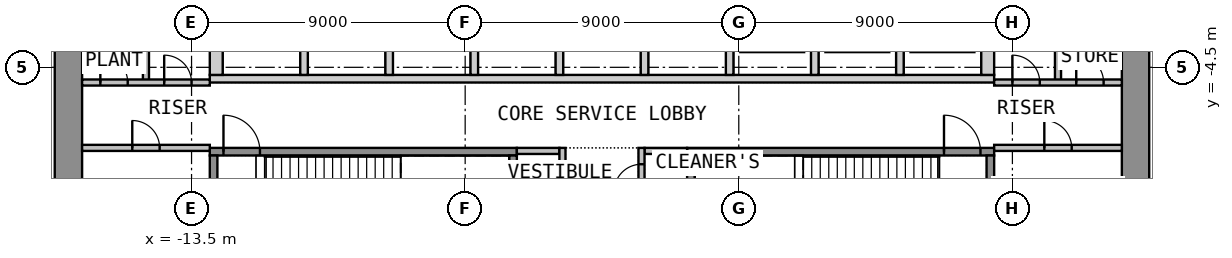
"""IFC4 building model, lengths in metres.
Left out: names, types, materials, properties, quantities, classifications, styles, units other than length and angle.
Written with IfcOpenShell. Run it as: python <this file> out.ifc"""

import sys

from ifc_helpers import new_model, si_unit, direction, frame, frame_2d, origin, place, context, subcontext, project, spatial, polyline, rectangle, outline, extrude, element, fill, save


model = new_model("IFC4")
c1 = context("Model", 3, precision=1e-05, world=origin(), true_north=direction((0.0, 1.0)))
c2 = subcontext(c1, "Body", "Model", "MODEL_VIEW")
j1 = project(units=[si_unit("LENGTHUNIT", "METRE"), si_unit("PLANEANGLEUNIT", "RADIAN")], contexts=[c1])
p1 = place(None, origin())
s1 = spatial("IfcSite", under=j1, at=p1, CompositionType="ELEMENT")
p2 = place(p1, origin())
s2 = spatial("IfcBuilding", under=s1, at=p2, CompositionType="ELEMENT")
p3 = place(p2, origin())
s3 = spatial("IfcBuildingStorey", under=s2, at=p3, CompositionType="ELEMENT", Elevation=0.0)
p4 = place(p3, frame((-17.55, -12.6, 0.0), z_axis=(0.0, 0.0, 1.0), x_axis=(0.0, 1.0, 0.0)))
e1 = element("IfcWall", 1, at=p4, inside=s3, PredefinedType="SHEAR", context=c2, shape_type="SweptSolid", body=[
    extrude(rectangle(XDim=25.2, YDim=0.9, at=frame_2d((12.6, 0.0))), origin(), (0.0, 0.0, 1.0), 5.6),
])
p5 = place(p4, frame((11.4, 0.0, 0.0)))
e2 = element("IfcOpeningElement", 2, at=p5, cuts=e1, PredefinedType="OPENING", context=c2, shape_type="SweptSolid", body=[
    extrude(rectangle(XDim=2.4, YDim=2.1, at=frame_2d((1.2, 1.05))), frame((0.0, 0.46, 0.0), z_axis=(0.0, -1.0, 0.0), x_axis=(1.0, 0.0, 0.0)), (0.0, 0.0, 1.0), 0.92),
])
p6 = place(p3, frame((17.55, -12.6, 0.0), z_axis=(0.0, 0.0, 1.0), x_axis=(0.0, 1.0, 0.0)))
e3 = element("IfcWall", 3, at=p6, inside=s3, PredefinedType="SHEAR", context=c2, shape_type="SweptSolid", body=[
    extrude(rectangle(XDim=25.2, YDim=0.9, at=frame_2d((12.6, 0.0))), origin(), (0.0, 0.0, 1.0), 5.6),
])
p7 = place(p6, frame((11.4, 0.0, 0.0)))
e4 = element("IfcOpeningElement", 4, at=p7, cuts=e3, PredefinedType="OPENING", context=c2, shape_type="SweptSolid", body=[
    extrude(rectangle(XDim=2.4, YDim=2.1, at=frame_2d((1.2, 1.05))), frame((0.0, 0.46, 0.0), z_axis=(0.0, -1.0, 0.0), x_axis=(1.0, 0.0, 0.0)), (0.0, 0.0, 1.0), 0.92),
])
p8 = place(p3, origin())
e5 = element("IfcWall", 5, at=p8, inside=s3, PredefinedType="SHEAR", context=c2, shape_type="SweptSolid", body=[
    extrude(outline(polyline([(-12.9, -5.0), (12.9, -5.0), (12.9, -4.75), (-12.9, -4.75), (-12.9, -5.0)])), origin(), (0.0, 0.0, 1.0), 5.6),
])
p9 = place(p3, origin())
e6 = element("IfcWall", 6, at=p9, inside=s3, PredefinedType="SHEAR", context=c2, shape_type="SweptSolid", body=[
    extrude(outline(polyline([(-12.9, -4.75), (-12.475, -4.75), (-12.475, -2.05), (-12.9, -2.05), (-12.9, -4.75)])), origin(), (0.0, 0.0, 1.0), 5.6),
])
p10 = place(p3, origin())
e7 = element("IfcWall", 7, at=p10, inside=s3, PredefinedType="SHEAR", context=c2, shape_type="SweptSolid", body=[
    extrude(outline(polyline([(-9.925, -4.75), (-9.675, -4.75), (-9.675, -2.05), (-9.925, -2.05), (-9.925, -4.75)])), origin(), (0.0, 0.0, 1.0), 5.6),
])
p11 = place(p3, origin())
e8 = element("IfcWall", 8, at=p11, inside=s3, PredefinedType="SHEAR", context=c2, shape_type="SweptSolid", body=[
    extrude(outline(polyline([(-7.125, -4.75), (-6.875, -4.75), (-6.875, -2.05), (-7.125, -2.05), (-7.125, -4.75)])), origin(), (0.0, 0.0, 1.0), 5.6),
])
p12 = place(p3, origin())
e9 = element("IfcWall", 9, at=p12, inside=s3, PredefinedType="SHEAR", context=c2, shape_type="SweptSolid", body=[
    extrude(outline(polyline([(-4.325, -4.75), (-4.075, -4.75), (-4.075, -2.05), (-4.325, -2.05), (-4.325, -4.75)])), origin(), (0.0, 0.0, 1.0), 5.6),
])
p13 = place(p3, origin())
e10 = element("IfcWall", 10, at=p13, inside=s3, PredefinedType="SHEAR", context=c2, shape_type="SweptSolid", body=[
    extrude(outline(polyline([(-1.525, -4.75), (-1.275, -4.75), (-1.275, -2.05), (-1.525, -2.05), (-1.525, -4.75)])), origin(), (0.0, 0.0, 1.0), 5.6),
])
p14 = place(p3, origin())
e11 = element("IfcWall", 11, at=p14, inside=s3, PredefinedType="SHEAR", context=c2, shape_type="SweptSolid", body=[
    extrude(outline(polyline([(1.275, -4.75), (1.525, -4.75), (1.525, -2.05), (1.275, -2.05), (1.275, -4.75)])), origin(), (0.0, 0.0, 1.0), 5.6),
])
p15 = place(p3, origin())
e12 = element("IfcWall", 12, at=p15, inside=s3, PredefinedType="SHEAR", context=c2, shape_type="SweptSolid", body=[
    extrude(outline(polyline([(4.075, -4.75), (4.325, -4.75), (4.325, -2.05), (4.075, -2.05), (4.075, -4.75)])), origin(), (0.0, 0.0, 1.0), 5.6),
])
p16 = place(p3, origin())
e13 = element("IfcWall", 13, at=p16, inside=s3, PredefinedType="SHEAR", context=c2, shape_type="SweptSolid", body=[
    extrude(outline(polyline([(6.875, -4.75), (7.125, -4.75), (7.125, -2.05), (6.875, -2.05), (6.875, -4.75)])), origin(), (0.0, 0.0, 1.0), 5.6),
])
p17 = place(p3, origin())
e14 = element("IfcWall", 14, at=p17, inside=s3, PredefinedType="SHEAR", context=c2, shape_type="SweptSolid", body=[
    extrude(outline(polyline([(9.675, -4.75), (9.925, -4.75), (9.925, -2.05), (9.675, -2.05), (9.675, -4.75)])), origin(), (0.0, 0.0, 1.0), 5.6),
])
p18 = place(p3, origin())
e15 = element("IfcWall", 15, at=p18, inside=s3, PredefinedType="SHEAR", context=c2, shape_type="SweptSolid", body=[
    extrude(outline(polyline([(12.475, -4.75), (12.9, -4.75), (12.9, -2.05), (12.475, -2.05), (12.475, -4.75)])), origin(), (0.0, 0.0, 1.0), 5.6),
])
p19 = place(p3, frame((-12.9, -7.275, 0.0), z_axis=(0.0, 0.0, 1.0), x_axis=(1.0, 0.0, 0.0)))
e16 = element("IfcWall", 16, at=p19, inside=s3, PredefinedType="SHEAR", context=c2, shape_type="SweptSolid", body=[
    extrude(rectangle(XDim=10.1, YDim=0.25, at=frame_2d((5.05, 0.0))), origin(), (0.0, 0.0, 1.0), 5.6),
])
p20 = place(p19, frame((0.45, 0.0, 0.0)))
e17 = element("IfcOpeningElement", 17, at=p20, cuts=e16, PredefinedType="OPENING", context=c2, shape_type="SweptSolid", body=[
    extrude(rectangle(XDim=1.2, YDim=2.1, at=frame_2d((0.6, 1.05))), frame((0.0, 0.135, 0.0), z_axis=(0.0, -1.0, 0.0), x_axis=(1.0, 0.0, 0.0)), (0.0, 0.0, 1.0), 0.27),
])
for number, where, z_axis, x_axis in (
    (18, (-12.775, -10.65, 0.0), (0.0, 0.0, 1.0), (0.0, 1.0, 0.0)),
    (19, (-2.925, -10.65, 0.0), (0.0, 0.0, 1.0), (0.0, 1.0, 0.0)),
):
    element("IfcWall", number, at=place(p3, frame(where, z_axis=z_axis, x_axis=x_axis)), inside=s3, PredefinedType="SHEAR", context=c2, shape_type="SweptSolid", body=[
        extrude(rectangle(XDim=3.25, YDim=0.25, at=frame_2d((1.625, 0.0))), origin(), (0.0, 0.0, 1.0), 5.6),
    ])
p21 = place(p3, frame((2.8, -7.275, 0.0), z_axis=(0.0, 0.0, 1.0), x_axis=(1.0, 0.0, 0.0)))
e20 = element("IfcWall", 20, at=p21, inside=s3, PredefinedType="SHEAR", context=c2, shape_type="SweptSolid", body=[
    extrude(rectangle(XDim=10.1, YDim=0.25, at=frame_2d((5.05, 0.0))), origin(), (0.0, 0.0, 1.0), 5.6),
])
p22 = place(p21, frame((8.45, 0.0, 0.0)))
e21 = element("IfcOpeningElement", 21, at=p22, cuts=e20, PredefinedType="OPENING", context=c2, shape_type="SweptSolid", body=[
    extrude(rectangle(XDim=1.2, YDim=2.1, at=frame_2d((0.6, 1.05))), frame((0.0, 0.135, 0.0), z_axis=(0.0, -1.0, 0.0), x_axis=(1.0, 0.0, 0.0)), (0.0, 0.0, 1.0), 0.27),
])
for number, where, z_axis, x_axis in (
    (22, (2.925, -10.65, 0.0), (0.0, 0.0, 1.0), (0.0, 1.0, 0.0)),
    (23, (12.775, -10.65, 0.0), (0.0, 0.0, 1.0), (0.0, 1.0, 0.0)),
):
    element("IfcWall", number, at=place(p3, frame(where, z_axis=z_axis, x_axis=x_axis)), inside=s3, PredefinedType="SHEAR", context=c2, shape_type="SweptSolid", body=[
        extrude(rectangle(XDim=3.25, YDim=0.25, at=frame_2d((1.625, 0.0))), origin(), (0.0, 0.0, 1.0), 5.6),
    ])
for number, where, z_axis, x_axis in (
    (24, (-2.8, -7.25, 0.0), (0.0, 0.0, 1.0), (1.0, 0.0, 0.0)),
    (25, (1.4, -7.25, 0.0), (0.0, 0.0, 1.0), (1.0, 0.0, 0.0)),
):
    element("IfcWall", number, at=place(p3, frame(where, z_axis=z_axis, x_axis=x_axis)), inside=s3, PredefinedType="PARTITIONING", context=c2, shape_type="SweptSolid", body=[
        extrude(rectangle(XDim=1.4, YDim=0.2, at=frame_2d((0.7, 0.0))), origin(), (0.0, 0.0, 1.0), 5.6),
    ])
p23 = place(p3, frame((-1.3, -12.6, 0.0), z_axis=(0.0, 0.0, 1.0), x_axis=(0.0, 1.0, 0.0)))
e26 = element("IfcWall", 26, at=p23, inside=s3, PredefinedType="PARTITIONING", context=c2, shape_type="SweptSolid", body=[
    extrude(rectangle(XDim=5.45, YDim=0.2, at=frame_2d((2.725, 0.0))), origin(), (0.0, 0.0, 1.0), 5.6),
])
p24 = place(p23, frame((0.337, 0.0, 0.0)))
e27 = element("IfcOpeningElement", 27, at=p24, cuts=e26, PredefinedType="OPENING", context=c2, shape_type="SweptSolid", body=[
    extrude(rectangle(XDim=0.9, YDim=2.1, at=frame_2d((0.45, 1.05))), frame((0.0, 0.11, 0.0), z_axis=(0.0, -1.0, 0.0), x_axis=(1.0, 0.0, 0.0)), (0.0, 0.0, 1.0), 0.22),
])
p25 = place(p23, frame((2.962, 0.0, 0.0)))
e28 = element("IfcOpeningElement", 28, at=p25, cuts=e26, PredefinedType="OPENING", context=c2, shape_type="SweptSolid", body=[
    extrude(rectangle(XDim=0.9, YDim=2.1, at=frame_2d((0.45, 1.05))), frame((0.0, 0.11, 0.0), z_axis=(0.0, -1.0, 0.0), x_axis=(1.0, 0.0, 0.0)), (0.0, 0.0, 1.0), 0.22),
])
p26 = place(p3, frame((1.3, -12.6, 0.0), z_axis=(0.0, 0.0, 1.0), x_axis=(0.0, 1.0, 0.0)))
e29 = element("IfcWall", 29, at=p26, inside=s3, PredefinedType="PARTITIONING", context=c2, shape_type="SweptSolid", body=[
    extrude(rectangle(XDim=5.45, YDim=0.2, at=frame_2d((2.725, 0.0))), origin(), (0.0, 0.0, 1.0), 5.6),
])
p27 = place(p26, frame((1.387, 0.0, 0.0)))
e30 = element("IfcOpeningElement", 30, at=p27, cuts=e29, PredefinedType="OPENING", context=c2, shape_type="SweptSolid", body=[
    extrude(rectangle(XDim=0.9, YDim=2.1, at=frame_2d((0.45, 1.05))), frame((0.0, 0.11, 0.0), z_axis=(0.0, -1.0, 0.0), x_axis=(1.0, 0.0, 0.0)), (0.0, 0.0, 1.0), 0.22),
])
p28 = place(p26, frame((4.012, 0.0, 0.0)))
e31 = element("IfcOpeningElement", 31, at=p28, cuts=e29, PredefinedType="OPENING", context=c2, shape_type="SweptSolid", body=[
    extrude(rectangle(XDim=0.9, YDim=2.1, at=frame_2d((0.45, 1.05))), frame((0.0, 0.11, 0.0), z_axis=(0.0, -1.0, 0.0), x_axis=(1.0, 0.0, 0.0)), (0.0, 0.0, 1.0), 0.22),
])
p29 = place(p3, frame((-17.1, -7.15, 0.0), z_axis=(0.0, 0.0, 1.0), x_axis=(1.0, 0.0, 0.0)))
e32 = element("IfcWall", 32, at=p29, inside=s3, PredefinedType="PARTITIONING", context=c2, shape_type="SweptSolid", body=[
    extrude(rectangle(XDim=4.2, YDim=0.2, at=frame_2d((2.1, 0.0))), origin(), (0.0, 0.0, 1.0), 5.6),
])
p30 = place(p29, frame((1.65, 0.0, 0.0)))
e33 = element("IfcOpeningElement", 33, at=p30, cuts=e32, PredefinedType="OPENING", context=c2, shape_type="SweptSolid", body=[
    extrude(rectangle(XDim=0.9, YDim=2.1, at=frame_2d((0.45, 1.05))), frame((0.0, 0.11, 0.0), z_axis=(0.0, -1.0, 0.0), x_axis=(1.0, 0.0, 0.0)), (0.0, 0.0, 1.0), 0.22),
])
p31 = place(p3, frame((-15.0, -5.0, 0.0), z_axis=(0.0, 0.0, 1.0), x_axis=(0.0, 1.0, 0.0)))
e34 = element("IfcWall", 34, at=p31, inside=s3, PredefinedType="PARTITIONING", context=c2, shape_type="SweptSolid", body=[
    extrude(rectangle(XDim=3.2, YDim=0.2, at=frame_2d((1.6, 0.0))), origin(), (0.0, 0.0, 1.0), 5.6),
])
p32 = place(p3, frame((-17.1, -5.0, 0.0), z_axis=(0.0, 0.0, 1.0), x_axis=(1.0, 0.0, 0.0)))
e35 = element("IfcWall", 35, at=p32, inside=s3, PredefinedType="PARTITIONING", context=c2, shape_type="SweptSolid", body=[
    extrude(rectangle(XDim=4.2, YDim=0.2, at=frame_2d((2.1, 0.0))), origin(), (0.0, 0.0, 1.0), 5.6),
])
p33 = place(p32, frame((0.6, 0.0, 0.0)))
e36 = element("IfcOpeningElement", 36, at=p33, cuts=e35, PredefinedType="OPENING", context=c2, shape_type="SweptSolid", body=[
    extrude(rectangle(XDim=0.9, YDim=2.1, at=frame_2d((0.45, 1.05))), frame((0.0, 0.11, 0.0), z_axis=(0.0, -1.0, 0.0), x_axis=(1.0, 0.0, 0.0)), (0.0, 0.0, 1.0), 0.22),
])
p34 = place(p32, frame((2.7, 0.0, 0.0)))
e37 = element("IfcOpeningElement", 37, at=p34, cuts=e35, PredefinedType="OPENING", context=c2, shape_type="SweptSolid", body=[
    extrude(rectangle(XDim=0.9, YDim=2.1, at=frame_2d((0.45, 1.05))), frame((0.0, 0.11, 0.0), z_axis=(0.0, -1.0, 0.0), x_axis=(1.0, 0.0, 0.0)), (0.0, 0.0, 1.0), 0.22),
])
p35 = place(p3, frame((12.9, -7.15, 0.0), z_axis=(0.0, 0.0, 1.0), x_axis=(1.0, 0.0, 0.0)))
e38 = element("IfcWall", 38, at=p35, inside=s3, PredefinedType="PARTITIONING", context=c2, shape_type="SweptSolid", body=[
    extrude(rectangle(XDim=4.2, YDim=0.2, at=frame_2d((2.1, 0.0))), origin(), (0.0, 0.0, 1.0), 5.6),
])
p36 = place(p35, frame((1.65, 0.0, 0.0)))
e39 = element("IfcOpeningElement", 39, at=p36, cuts=e38, PredefinedType="OPENING", context=c2, shape_type="SweptSolid", body=[
    extrude(rectangle(XDim=0.9, YDim=2.1, at=frame_2d((0.45, 1.05))), frame((0.0, 0.11, 0.0), z_axis=(0.0, -1.0, 0.0), x_axis=(1.0, 0.0, 0.0)), (0.0, 0.0, 1.0), 0.22),
])
p37 = place(p3, frame((15.0, -5.0, 0.0), z_axis=(0.0, 0.0, 1.0), x_axis=(0.0, 1.0, 0.0)))
e40 = element("IfcWall", 40, at=p37, inside=s3, PredefinedType="PARTITIONING", context=c2, shape_type="SweptSolid", body=[
    extrude(rectangle(XDim=3.2, YDim=0.2, at=frame_2d((1.6, 0.0))), origin(), (0.0, 0.0, 1.0), 5.6),
])
p38 = place(p3, frame((12.9, -5.0, 0.0), z_axis=(0.0, 0.0, 1.0), x_axis=(1.0, 0.0, 0.0)))
e41 = element("IfcWall", 41, at=p38, inside=s3, PredefinedType="PARTITIONING", context=c2, shape_type="SweptSolid", body=[
    extrude(rectangle(XDim=4.2, YDim=0.2, at=frame_2d((2.1, 0.0))), origin(), (0.0, 0.0, 1.0), 5.6),
])
p39 = place(p38, frame((0.6, 0.0, 0.0)))
e42 = element("IfcOpeningElement", 42, at=p39, cuts=e41, PredefinedType="OPENING", context=c2, shape_type="SweptSolid", body=[
    extrude(rectangle(XDim=0.9, YDim=2.1, at=frame_2d((0.45, 1.05))), frame((0.0, 0.11, 0.0), z_axis=(0.0, -1.0, 0.0), x_axis=(1.0, 0.0, 0.0)), (0.0, 0.0, 1.0), 0.22),
])
p40 = place(p38, frame((2.7, 0.0, 0.0)))
e43 = element("IfcOpeningElement", 43, at=p40, cuts=e41, PredefinedType="OPENING", context=c2, shape_type="SweptSolid", body=[
    extrude(rectangle(XDim=0.9, YDim=2.1, at=frame_2d((0.45, 1.05))), frame((0.0, 0.11, 0.0), z_axis=(0.0, -1.0, 0.0), x_axis=(1.0, 0.0, 0.0)), (0.0, 0.0, 1.0), 0.22),
])
p41 = place(p20, origin())
e44 = element("IfcDoor", 44, at=p41, inside=s3, OperationType="SINGLE_SWING_LEFT", PredefinedType="DOOR", context=c2, shape_type="SweptSolid", body=[
    extrude(rectangle(XDim=1.2, YDim=2.1, at=frame_2d((0.6, 1.05))), frame((0.0, 0.025, 0.0), z_axis=(0.0, -1.0, 0.0), x_axis=(1.0, 0.0, 0.0)), (0.0, 0.0, 1.0), 0.05),
])
fill(e17, e44)
p42 = place(p22, origin())
e45 = element("IfcDoor", 45, at=p42, inside=s3, OperationType="SINGLE_SWING_LEFT", PredefinedType="DOOR", context=c2, shape_type="SweptSolid", body=[
    extrude(rectangle(XDim=1.2, YDim=2.1, at=frame_2d((0.6, 1.05))), frame((0.0, 0.025, 0.0), z_axis=(0.0, -1.0, 0.0), x_axis=(1.0, 0.0, 0.0)), (0.0, 0.0, 1.0), 0.05),
])
fill(e21, e45)
p43 = place(p28, origin())
e46 = element("IfcDoor", 46, at=p43, inside=s3, OperationType="SINGLE_SWING_LEFT", PredefinedType="DOOR", context=c2, shape_type="SweptSolid", body=[
    extrude(rectangle(XDim=0.9, YDim=2.1, at=frame_2d((0.45, 1.05))), frame((0.0, 0.025, 0.0), z_axis=(0.0, -1.0, 0.0), x_axis=(1.0, 0.0, 0.0)), (0.0, 0.0, 1.0), 0.05),
])
fill(e31, e46)
p44 = place(p30, origin())
e47 = element("IfcDoor", 47, at=p44, inside=s3, OperationType="SINGLE_SWING_LEFT", PredefinedType="DOOR", context=c2, shape_type="SweptSolid", body=[
    extrude(rectangle(XDim=0.9, YDim=2.1, at=frame_2d((0.45, 1.05))), frame((0.0, 0.025, 0.0), z_axis=(0.0, -1.0, 0.0), x_axis=(1.0, 0.0, 0.0)), (0.0, 0.0, 1.0), 0.05),
])
fill(e33, e47)
p45 = place(p33, origin())
e48 = element("IfcDoor", 48, at=p45, inside=s3, OperationType="SINGLE_SWING_LEFT", PredefinedType="DOOR", context=c2, shape_type="SweptSolid", body=[
    extrude(rectangle(XDim=0.9, YDim=2.1, at=frame_2d((0.45, 1.05))), frame((0.0, 0.025, 0.0), z_axis=(0.0, -1.0, 0.0), x_axis=(1.0, 0.0, 0.0)), (0.0, 0.0, 1.0), 0.05),
])
fill(e36, e48)
p46 = place(p34, origin())
e49 = element("IfcDoor", 49, at=p46, inside=s3, OperationType="SINGLE_SWING_LEFT", PredefinedType="DOOR", context=c2, shape_type="SweptSolid", body=[
    extrude(rectangle(XDim=0.9, YDim=2.1, at=frame_2d((0.45, 1.05))), frame((0.0, 0.025, 0.0), z_axis=(0.0, -1.0, 0.0), x_axis=(1.0, 0.0, 0.0)), (0.0, 0.0, 1.0), 0.05),
])
fill(e37, e49)
p47 = place(p36, origin())
e50 = element("IfcDoor", 50, at=p47, inside=s3, OperationType="SINGLE_SWING_LEFT", PredefinedType="DOOR", context=c2, shape_type="SweptSolid", body=[
    extrude(rectangle(XDim=0.9, YDim=2.1, at=frame_2d((0.45, 1.05))), frame((0.0, 0.025, 0.0), z_axis=(0.0, -1.0, 0.0), x_axis=(1.0, 0.0, 0.0)), (0.0, 0.0, 1.0), 0.05),
])
fill(e39, e50)
p48 = place(p39, origin())
e51 = element("IfcDoor", 51, at=p48, inside=s3, OperationType="SINGLE_SWING_LEFT", PredefinedType="DOOR", context=c2, shape_type="SweptSolid", body=[
    extrude(rectangle(XDim=0.9, YDim=2.1, at=frame_2d((0.45, 1.05))), frame((0.0, 0.025, 0.0), z_axis=(0.0, -1.0, 0.0), x_axis=(1.0, 0.0, 0.0)), (0.0, 0.0, 1.0), 0.05),
])
fill(e42, e51)
p49 = place(p40, origin())
e52 = element("IfcDoor", 52, at=p49, inside=s3, OperationType="SINGLE_SWING_LEFT", PredefinedType="DOOR", context=c2, shape_type="SweptSolid", body=[
    extrude(rectangle(XDim=0.9, YDim=2.1, at=frame_2d((0.45, 1.05))), frame((0.0, 0.025, 0.0), z_axis=(0.0, -1.0, 0.0), x_axis=(1.0, 0.0, 0.0)), (0.0, 0.0, 1.0), 0.05),
])
fill(e43, e52)
save(model, sys.argv[1])
